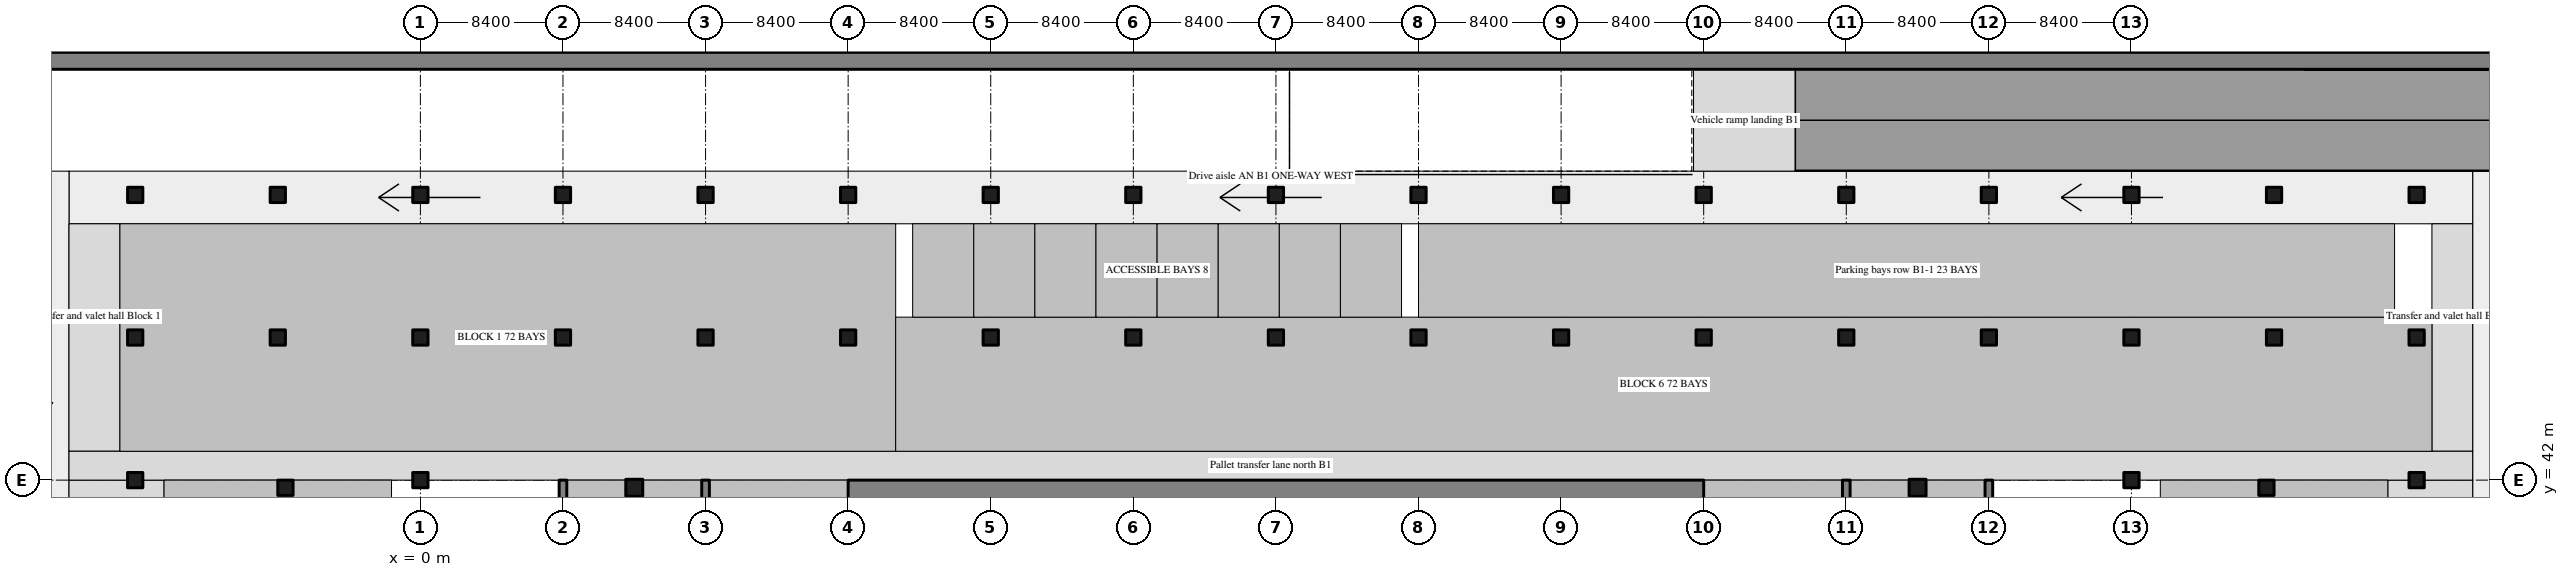
"""IFC4 building model, lengths in metres.
Left out: names, types, materials, properties, quantities, classifications, styles, units other than length and angle.
Written with IfcOpenShell. Run it as: python <this file> out.ifc"""

import sys

from ifc_helpers import new_model, si_unit, direction, frame, frame_2d, origin, origin_2d, place, context, subcontext, project, spatial, rectangle, extrude, source, transform, mapped, element, save


model = new_model("IFC4")
c1 = context("Model", 3, precision=1e-05, world=origin(), true_north=direction((0.0, 1.0)))
c2 = subcontext(c1, "Body", "Model", "MODEL_VIEW")
j1 = project(units=[si_unit("LENGTHUNIT", "METRE"), si_unit("PLANEANGLEUNIT", "RADIAN")], contexts=[c1])
p1 = place(None, origin())
s1 = spatial("IfcSite", under=j1, at=p1, CompositionType="ELEMENT")
p2 = place(p1, origin())
s2 = spatial("IfcBuilding", under=s1, at=p2, CompositionType="ELEMENT")
p3 = place(p2, frame((0.0, 0.0, -4.5)))
s3 = spatial("IfcBuildingStorey", under=s2, at=p3, CompositionType="ELEMENT", Elevation=-4.5)
m1 = source(origin(), c2, "Body", "SweptSolid", [
    extrude(rectangle(XDim=151.2, YDim=1.0, at=frame_2d((75.6, 0.0))), origin(), (0.0, 0.0, 1.0), 4.22),
])
p4 = place(p3, frame((-25.2, 66.7, 0.0), z_axis=(0.0, 0.0, 1.0), x_axis=(1.0, 0.0, 0.0)))
e1 = element("IfcWall", 1, at=p4, inside=s3, PredefinedType="SHEAR", context=c2, shape_type="MappedRepresentation", body=[
    mapped(m1, transform((0.0, 0.0, 0.0), scale=1.0)),
])
m2 = source(origin(), c2, "Body", "SweptSolid", [
    extrude(rectangle(XDim=50.4, YDim=1.1, at=frame_2d((25.2, 0.0))), origin(), (0.0, 0.0, 1.0), 4.22),
])
p5 = place(p3, frame((25.2, 41.45, 0.0), z_axis=(0.0, 0.0, 1.0), x_axis=(1.0, 0.0, 0.0)))
e2 = element("IfcWall", 2, at=p5, inside=s3, PredefinedType="SHEAR", context=c2, shape_type="MappedRepresentation", body=[
    mapped(m2, transform((0.0, 0.0, 0.0), scale=1.0)),
])
m3 = source(origin(), c2, "Body", "SweptSolid", [
    extrude(rectangle(XDim=20.0, YDim=0.45, at=frame_2d((10.0, 0.0))), origin(), (0.0, 0.0, 1.0), 4.22),
])
for number, where, z_axis, x_axis in (
    (3, (8.4, 22.0, 0.0), (0.0, 0.0, 1.0), (0.0, 1.0, 0.0)),
    (4, (16.8, 22.0, 0.0), (0.0, 0.0, 1.0), (0.0, 1.0, 0.0)),
    (5, (84.0, 22.0, 0.0), (0.0, 0.0, 1.0), (0.0, 1.0, 0.0)),
    (6, (92.4, 22.0, 0.0), (0.0, 0.0, 1.0), (0.0, 1.0, 0.0)),
):
    element("IfcWall", number, at=place(p3, frame(where, z_axis=z_axis, x_axis=x_axis)), inside=s3, PredefinedType="SHEAR", context=c2, shape_type="MappedRepresentation", body=[
        mapped(m3, transform((0.0, 0.0, 0.0), scale=1.0)),
    ])
m4 = source(origin(), c2, "Body", "SweptSolid", [
    extrude(rectangle(XDim=1.0, YDim=1.0, at=origin_2d()), origin(), (0.0, 0.0, 1.0), 4.22),
])
for number, where, z_axis, x_axis in (
    (7, (12.6, 41.55, 0.0), (0.0, 0.0, 1.0), (1.0, 0.0, 0.0)),
    (8, (88.2, 41.55, 0.0), (0.0, 0.0, 1.0), (1.0, 0.0, 0.0)),
):
    element("IfcColumn", number, at=place(p3, frame(where, z_axis=z_axis, x_axis=x_axis)), inside=s3, PredefinedType="COLUMN", context=c2, shape_type="MappedRepresentation", body=[
        mapped(m4, transform((0.0, 0.0, 0.0), scale=1.0)),
    ])
m5 = source(origin(), c2, "Body", "SweptSolid", [
    extrude(rectangle(XDim=0.9, YDim=0.9, at=origin_2d()), origin(), (0.0, 0.0, 1.0), 4.22),
])
for number, where, z_axis, x_axis in (
    (9, (-7.95, 41.55, 0.0), (0.0, 0.0, 1.0), (1.0, 0.0, 0.0)),
    (10, (108.75, 41.55, 0.0), (0.0, 0.0, 1.0), (1.0, 0.0, 0.0)),
    (11, (-16.8, 42.0, 0.0), (0.0, 0.0, 1.0), (1.0, 0.0, 0.0)),
    (12, (-16.8, 50.4, 0.0), (0.0, 0.0, 1.0), (1.0, 0.0, 0.0)),
    (13, (-16.8, 58.8, 0.0), (0.0, 0.0, 1.0), (1.0, 0.0, 0.0)),
    (14, (-8.4, 50.4, 0.0), (0.0, 0.0, 1.0), (1.0, 0.0, 0.0)),
    (15, (-8.4, 58.8, 0.0), (0.0, 0.0, 1.0), (1.0, 0.0, 0.0)),
    (16, (0.0, 42.0, 0.0), (0.0, 0.0, 1.0), (1.0, 0.0, 0.0)),
    (17, (0.0, 50.4, 0.0), (0.0, 0.0, 1.0), (1.0, 0.0, 0.0)),
    (18, (0.0, 58.8, 0.0), (0.0, 0.0, 1.0), (1.0, 0.0, 0.0)),
    (19, (8.4, 50.4, 0.0), (0.0, 0.0, 1.0), (1.0, 0.0, 0.0)),
    (20, (8.4, 58.8, 0.0), (0.0, 0.0, 1.0), (1.0, 0.0, 0.0)),
    (21, (16.8, 50.4, 0.0), (0.0, 0.0, 1.0), (1.0, 0.0, 0.0)),
    (22, (16.8, 58.8, 0.0), (0.0, 0.0, 1.0), (1.0, 0.0, 0.0)),
    (23, (25.2, 50.4, 0.0), (0.0, 0.0, 1.0), (1.0, 0.0, 0.0)),
    (24, (25.2, 58.8, 0.0), (0.0, 0.0, 1.0), (1.0, 0.0, 0.0)),
    (25, (33.6, 50.4, 0.0), (0.0, 0.0, 1.0), (1.0, 0.0, 0.0)),
    (26, (33.6, 58.8, 0.0), (0.0, 0.0, 1.0), (1.0, 0.0, 0.0)),
    (27, (42.0, 50.4, 0.0), (0.0, 0.0, 1.0), (1.0, 0.0, 0.0)),
    (28, (42.0, 58.8, 0.0), (0.0, 0.0, 1.0), (1.0, 0.0, 0.0)),
    (29, (50.4, 50.4, 0.0), (0.0, 0.0, 1.0), (1.0, 0.0, 0.0)),
    (30, (50.4, 58.8, 0.0), (0.0, 0.0, 1.0), (1.0, 0.0, 0.0)),
    (31, (58.8, 50.4, 0.0), (0.0, 0.0, 1.0), (1.0, 0.0, 0.0)),
    (32, (58.8, 58.8, 0.0), (0.0, 0.0, 1.0), (1.0, 0.0, 0.0)),
    (33, (67.2, 50.4, 0.0), (0.0, 0.0, 1.0), (1.0, 0.0, 0.0)),
    (34, (67.2, 58.8, 0.0), (0.0, 0.0, 1.0), (1.0, 0.0, 0.0)),
    (35, (75.6, 50.4, 0.0), (0.0, 0.0, 1.0), (1.0, 0.0, 0.0)),
    (36, (75.6, 58.8, 0.0), (0.0, 0.0, 1.0), (1.0, 0.0, 0.0)),
    (37, (84.0, 50.4, 0.0), (0.0, 0.0, 1.0), (1.0, 0.0, 0.0)),
    (38, (84.0, 58.8, 0.0), (0.0, 0.0, 1.0), (1.0, 0.0, 0.0)),
    (39, (92.4, 50.4, 0.0), (0.0, 0.0, 1.0), (1.0, 0.0, 0.0)),
    (40, (92.4, 58.8, 0.0), (0.0, 0.0, 1.0), (1.0, 0.0, 0.0)),
    (41, (100.8, 42.0, 0.0), (0.0, 0.0, 1.0), (1.0, 0.0, 0.0)),
    (42, (100.8, 50.4, 0.0), (0.0, 0.0, 1.0), (1.0, 0.0, 0.0)),
    (43, (100.8, 58.8, 0.0), (0.0, 0.0, 1.0), (1.0, 0.0, 0.0)),
    (44, (109.2, 50.4, 0.0), (0.0, 0.0, 1.0), (1.0, 0.0, 0.0)),
    (45, (109.2, 58.8, 0.0), (0.0, 0.0, 1.0), (1.0, 0.0, 0.0)),
    (46, (117.6, 42.0, 0.0), (0.0, 0.0, 1.0), (1.0, 0.0, 0.0)),
    (47, (117.6, 50.4, 0.0), (0.0, 0.0, 1.0), (1.0, 0.0, 0.0)),
    (48, (117.6, 58.8, 0.0), (0.0, 0.0, 1.0), (1.0, 0.0, 0.0)),
):
    element("IfcColumn", number, at=place(p3, frame(where, z_axis=z_axis, x_axis=x_axis)), inside=s3, PredefinedType="COLUMN", context=c2, shape_type="MappedRepresentation", body=[
        mapped(m5, transform((0.0, 0.0, 0.0), scale=1.0)),
    ])
save(model, sys.argv[1])
